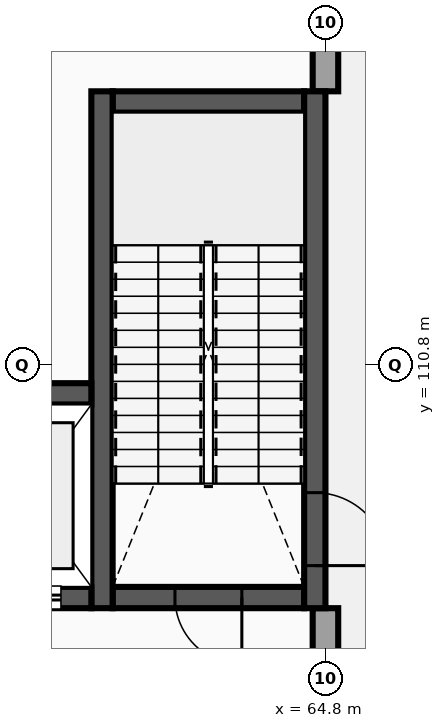
"""IFC4 building model, lengths in metres.
Left out: names, types, materials, properties, quantities, classifications, styles, units other than length and angle.
Written with IfcOpenShell. Run it as: python <this file> out.ifc"""

import sys

from ifc_helpers import new_model, si_unit, direction, frame, frame_2d, origin, place, context, subcontext, project, spatial, rectangle, extrude, element, fill, save


model = new_model("IFC4")
c1 = context("Model", 3, precision=1e-05, world=origin(), true_north=direction((0.0, 1.0)))
c2 = subcontext(c1, "Body", "Model", "MODEL_VIEW")
j1 = project(units=[si_unit("LENGTHUNIT", "METRE"), si_unit("PLANEANGLEUNIT", "RADIAN")], contexts=[c1])
p1 = place(None, origin())
s1 = spatial("IfcSite", under=j1, at=p1, CompositionType="ELEMENT")
p2 = place(p1, origin())
s2 = spatial("IfcBuilding", under=s1, at=p2, CompositionType="ELEMENT")
p3 = place(p2, origin())
s3 = spatial("IfcBuildingStorey", under=s2, at=p3, CompositionType="ELEMENT", Elevation=0.0)
p4 = place(p3, frame((64.8, 103.6, 0.0), z_axis=(0.0, 0.0, 1.0), x_axis=(0.0, 1.0, 0.0)))
e1 = element("IfcWall", 1, at=p4, inside=s3, PredefinedType="STANDARD", context=c2, shape_type="SweptSolid", body=[
    extrude(rectangle(XDim=3.2, YDim=0.42, at=frame_2d((1.6, 0.0))), origin(), (0.0, 0.0, 1.0), 4.97),
])
p5 = place(p4, frame((1.102, 0.0, 0.95)))
e2 = element("IfcOpeningElement", 2, at=p5, cuts=e1, PredefinedType="OPENING", context=c2, shape_type="SweptSolid", body=[
    extrude(rectangle(XDim=0.996, YDim=1.368, at=frame_2d((0.498, 0.684))), frame((0.0, 0.22, 0.0), z_axis=(0.0, -1.0, 0.0), x_axis=(1.0, 0.0, 0.0)), (0.0, 0.0, 1.0), 0.44),
])
p6 = place(p3, frame((64.8, 115.3, 0.0), z_axis=(0.0, 0.0, 1.0), x_axis=(0.0, 1.0, 0.0)))
e3 = element("IfcWall", 3, at=p6, inside=s3, PredefinedType="STANDARD", context=c2, shape_type="SweptSolid", body=[
    extrude(rectangle(XDim=2.49, YDim=0.42, at=frame_2d((1.245, 0.0))), origin(), (0.0, 0.0, 1.0), 4.97),
])
p7 = place(p3, frame((61.3, 106.975, 0.0), z_axis=(0.0, 0.0, 1.0), x_axis=(1.0, 0.0, 0.0)))
e4 = element("IfcWall", 4, at=p7, inside=s3, PredefinedType="SHEAR", context=c2, shape_type="SweptSolid", body=[
    extrude(rectangle(XDim=3.15, YDim=0.35, at=frame_2d((1.575, 0.0))), origin(), (0.0, 0.0, 1.0), 4.97),
])
p8 = place(p7, frame((1.025, 0.0, 0.0)))
e5 = element("IfcOpeningElement", 5, at=p8, cuts=e4, PredefinedType="OPENING", context=c2, shape_type="SweptSolid", body=[
    extrude(rectangle(XDim=1.1, YDim=2.15, at=frame_2d((0.55, 1.075))), frame((0.0, 0.185, 0.0), z_axis=(0.0, -1.0, 0.0), x_axis=(1.0, 0.0, 0.0)), (0.0, 0.0, 1.0), 0.37),
])
p9 = place(p3, frame((61.3, 115.125, 0.0), z_axis=(0.0, 0.0, 1.0), x_axis=(1.0, 0.0, 0.0)))
e6 = element("IfcWall", 6, at=p9, inside=s3, PredefinedType="SHEAR", context=c2, shape_type="SweptSolid", body=[
    extrude(rectangle(XDim=3.15, YDim=0.35, at=frame_2d((1.575, 0.0))), origin(), (0.0, 0.0, 1.0), 4.97),
])
p10 = place(p3, frame((61.125, 106.8, 0.0), z_axis=(0.0, 0.0, 1.0), x_axis=(0.0, 1.0, 0.0)))
e7 = element("IfcWall", 7, at=p10, inside=s3, PredefinedType="SHEAR", context=c2, shape_type="SweptSolid", body=[
    extrude(rectangle(XDim=8.5, YDim=0.35, at=frame_2d((4.25, 0.0))), origin(), (0.0, 0.0, 1.0), 4.97),
])
p11 = place(p3, frame((64.625, 106.8, 0.0), z_axis=(0.0, 0.0, 1.0), x_axis=(0.0, 1.0, 0.0)))
e8 = element("IfcWall", 8, at=p11, inside=s3, PredefinedType="SHEAR", context=c2, shape_type="SweptSolid", body=[
    extrude(rectangle(XDim=8.5, YDim=0.35, at=frame_2d((4.25, 0.0))), origin(), (0.0, 0.0, 1.0), 4.97),
])
p12 = place(p11, frame((0.7, 0.0, 0.0)))
e9 = element("IfcOpeningElement", 9, at=p12, cuts=e8, PredefinedType="OPENING", context=c2, shape_type="SweptSolid", body=[
    extrude(rectangle(XDim=1.2, YDim=2.15, at=frame_2d((0.6, 1.075))), frame((0.0, 0.185, 0.0), z_axis=(0.0, -1.0, 0.0), x_axis=(1.0, 0.0, 0.0)), (0.0, 0.0, 1.0), 0.37),
])
p13 = place(p3, frame((58.75, 106.975, 0.0), z_axis=(0.0, 0.0, 1.0), x_axis=(1.0, 0.0, 0.0)))
e10 = element("IfcWall", 10, at=p13, inside=s3, PredefinedType="SHEAR", context=c2, shape_type="SweptSolid", body=[
    extrude(rectangle(XDim=2.2, YDim=0.35, at=frame_2d((1.1, 0.0))), origin(), (0.0, 0.0, 1.0), 4.97),
])
p14 = place(p13, frame((0.5, 0.0, 0.0)))
e11 = element("IfcOpeningElement", 11, at=p14, cuts=e10, PredefinedType="OPENING", context=c2, shape_type="SweptSolid", body=[
    extrude(rectangle(XDim=1.2, YDim=2.2, at=frame_2d((0.6, 1.1))), frame((0.0, 0.185, 0.0), z_axis=(0.0, -1.0, 0.0), x_axis=(1.0, 0.0, 0.0)), (0.0, 0.0, 1.0), 0.37),
])
p15 = place(p3, frame((58.75, 110.325, 0.0), z_axis=(0.0, 0.0, 1.0), x_axis=(1.0, 0.0, 0.0)))
e12 = element("IfcWall", 12, at=p15, inside=s3, PredefinedType="SHEAR", context=c2, shape_type="SweptSolid", body=[
    extrude(rectangle(XDim=2.2, YDim=0.35, at=frame_2d((1.1, 0.0))), origin(), (0.0, 0.0, 1.0), 4.97),
])
p16 = place(p8, origin())
e13 = element("IfcDoor", 13, at=p16, inside=s3, OperationType="SINGLE_SWING_RIGHT", PredefinedType="DOOR", context=c2, shape_type="SweptSolid", body=[
    extrude(rectangle(XDim=1.1, YDim=2.15, at=frame_2d((0.55, 1.075))), frame((0.0, 0.025, 0.0), z_axis=(0.0, -1.0, 0.0), x_axis=(1.0, 0.0, 0.0)), (0.0, 0.0, 1.0), 0.05),
])
fill(e5, e13)
p17 = place(p12, frame((1.2, 0.0, 0.0), z_axis=(0.0, 0.0, 1.0), x_axis=(-1.0, 0.0, 0.0)))
e14 = element("IfcDoor", 14, at=p17, inside=s3, OperationType="SINGLE_SWING_LEFT", PredefinedType="DOOR", context=c2, shape_type="SweptSolid", body=[
    extrude(rectangle(XDim=1.2, YDim=2.15, at=frame_2d((0.6, 1.075))), frame((0.0, 0.025, 0.0), z_axis=(0.0, -1.0, 0.0), x_axis=(1.0, 0.0, 0.0)), (0.0, 0.0, 1.0), 0.05),
])
fill(e9, e14)
p18 = place(p14, origin())
e15 = element("IfcDoor", 15, at=p18, inside=s3, OperationType="SLIDING_TO_RIGHT", PredefinedType="DOOR", context=c2, shape_type="SweptSolid", body=[
    extrude(rectangle(XDim=1.2, YDim=2.2, at=frame_2d((0.6, 1.1))), frame((0.0, 0.025, 0.0), z_axis=(0.0, -1.0, 0.0), x_axis=(1.0, 0.0, 0.0)), (0.0, 0.0, 1.0), 0.05),
])
fill(e11, e15)
save(model, sys.argv[1])
